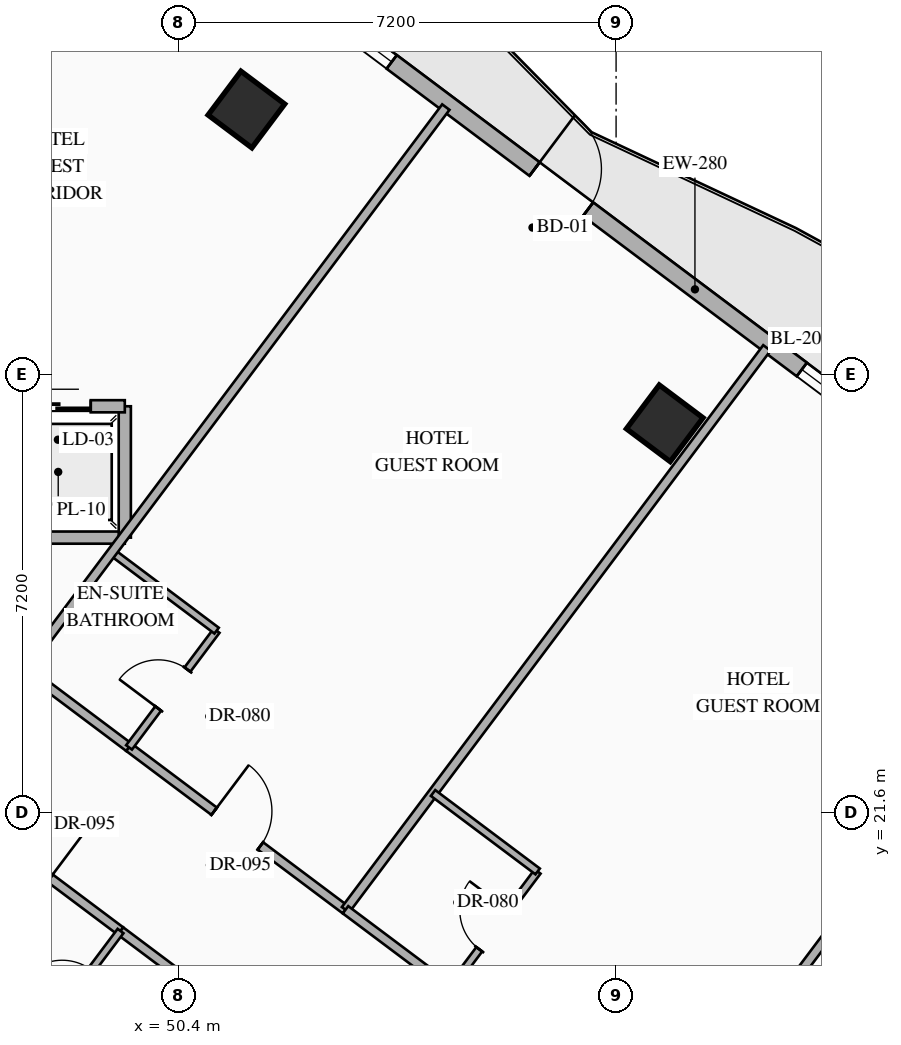
"""IFC4 building model, lengths in metres.
Left out: names, types, materials, properties, quantities, classifications, styles, units other than length and angle.
Written with IfcOpenShell. Run it as: python <this file> out.ifc"""

import sys

from ifc_helpers import new_model, si_unit, direction, frame, frame_2d, origin, origin_2d, place, context, subcontext, project, spatial, rectangle, hollow_rectangle, extrude, element, fill, save


model = new_model("IFC4")
c1 = context("Model", 3, precision=1e-05, world=origin(), true_north=direction((0.0, 1.0)))
c2 = subcontext(c1, "Body", "Model", "MODEL_VIEW")
j1 = project(units=[si_unit("LENGTHUNIT", "METRE"), si_unit("PLANEANGLEUNIT", "RADIAN")], contexts=[c1])
p1 = place(None, origin())
s1 = spatial("IfcSite", under=j1, at=p1, CompositionType="ELEMENT")
p2 = place(p1, origin())
s2 = spatial("IfcBuilding", under=s1, at=p2, CompositionType="ELEMENT")
p3 = place(p2, frame((0.0, 0.0, 77.95)))
s3 = spatial("IfcBuildingStorey", under=s2, at=p3, CompositionType="ELEMENT", Elevation=77.95)
for number, where, z_axis, x_axis in (
    (1, (51.52, 33.16, 0.0), (0.0, 0.0, 1.0), (0.8, -0.6, 0.0)),
    (2, (58.4, 28.0, 0.0), (0.0, 0.0, 1.0), (0.8, -0.6, 0.0)),
):
    element("IfcColumn", number, at=place(p3, frame(where, z_axis=z_axis, x_axis=x_axis)), inside=s3, PredefinedType="COLUMN", context=c2, shape_type="SweptSolid", body=[
        extrude(hollow_rectangle(XDim=0.9, YDim=0.9, WallThickness=0.036, at=origin_2d()), origin(), (0.0, 0.0, 1.0), 3.35),
    ])
p4 = place(p3, frame((44.86, 40.73, 0.0), z_axis=(0.0, 0.0, 1.0), x_axis=(0.800006902154, -0.599990797017, 0.0)))
e3 = element("IfcWall", 3, at=p4, inside=s3, PredefinedType="STANDARD", context=c2, shape_type="SweptSolid", body=[
    extrude(rectangle(XDim=29.712, YDim=0.28, at=frame_2d((14.856, 0.0))), origin(), (0.0, 0.0, 1.0), 3.13),
])
p5 = place(p4, frame((14.249, 0.0, 0.0)))
e4 = element("IfcOpeningElement", 4, at=p5, cuts=e3, PredefinedType="OPENING", context=c2, shape_type="SweptSolid", body=[
    extrude(rectangle(XDim=1.1, YDim=2.2, at=frame_2d((0.55, 1.1))), frame((0.0, 0.15, 0.0), z_axis=(0.0, -1.0, 0.0), x_axis=(1.0, 0.0, 0.0)), (0.0, 0.0, 1.0), 0.3),
])
p6 = place(p4, frame((1.612, 0.0, 0.85)))
e5 = element("IfcOpeningElement", 5, at=p6, cuts=e3, PredefinedType="OPENING", context=c2, shape_type="SweptSolid", body=[
    extrude(rectangle(XDim=1.4, YDim=1.8, at=frame_2d((0.7, 0.9))), frame((0.0, 0.15, 0.0), z_axis=(0.0, -1.0, 0.0), x_axis=(1.0, 0.0, 0.0)), (0.0, 0.0, 1.0), 0.3),
])
p7 = place(p4, frame((5.667, 0.0, 0.85)))
e6 = element("IfcOpeningElement", 6, at=p7, cuts=e3, PredefinedType="OPENING", context=c2, shape_type="SweptSolid", body=[
    extrude(rectangle(XDim=1.4, YDim=1.8, at=frame_2d((0.7, 0.9))), frame((0.0, 0.15, 0.0), z_axis=(0.0, -1.0, 0.0), x_axis=(1.0, 0.0, 0.0)), (0.0, 0.0, 1.0), 0.3),
])
p8 = place(p4, frame((9.912, 0.0, 0.85)))
e7 = element("IfcOpeningElement", 7, at=p8, cuts=e3, PredefinedType="OPENING", context=c2, shape_type="SweptSolid", body=[
    extrude(rectangle(XDim=1.4, YDim=1.8, at=frame_2d((0.7, 0.9))), frame((0.0, 0.15, 0.0), z_axis=(0.0, -1.0, 0.0), x_axis=(1.0, 0.0, 0.0)), (0.0, 0.0, 1.0), 0.3),
])
p9 = place(p4, frame((19.743, 0.0, 0.85)))
e8 = element("IfcOpeningElement", 8, at=p9, cuts=e3, PredefinedType="OPENING", context=c2, shape_type="SweptSolid", body=[
    extrude(rectangle(XDim=1.4, YDim=1.8, at=frame_2d((0.7, 0.9))), frame((0.0, 0.15, 0.0), z_axis=(0.0, -1.0, 0.0), x_axis=(1.0, 0.0, 0.0)), (0.0, 0.0, 1.0), 0.3),
])
p10 = place(p4, frame((22.645, 0.0, 0.85)))
e9 = element("IfcOpeningElement", 9, at=p10, cuts=e3, PredefinedType="OPENING", context=c2, shape_type="SweptSolid", body=[
    extrude(rectangle(XDim=1.4, YDim=1.8, at=frame_2d((0.7, 0.9))), frame((0.0, 0.15, 0.0), z_axis=(0.0, -1.0, 0.0), x_axis=(1.0, 0.0, 0.0)), (0.0, 0.0, 1.0), 0.3),
])
p11 = place(p4, frame((26.7, 0.0, 0.85)))
e10 = element("IfcOpeningElement", 10, at=p11, cuts=e3, PredefinedType="OPENING", context=c2, shape_type="SweptSolid", body=[
    extrude(rectangle(XDim=1.4, YDim=1.8, at=frame_2d((0.7, 0.9))), frame((0.0, 0.15, 0.0), z_axis=(0.0, -1.0, 0.0), x_axis=(1.0, 0.0, 0.0)), (0.0, 0.0, 1.0), 0.3),
])
p12 = place(p3, frame((53.318, 2.487, 0.0), z_axis=(0.0, 0.0, 1.0), x_axis=(-0.800004174678, 0.599994433723, 0.0)))
e11 = element("IfcWall", 11, at=p12, inside=s3, PredefinedType="STANDARD", context=c2, shape_type="SweptSolid", body=[
    extrude(rectangle(XDim=35.089, YDim=0.28, at=frame_2d((17.544, 0.0))), origin(), (0.0, 0.0, 1.0), 3.13),
])
p13 = place(p12, frame((1.931, 0.0, 0.85)))
e12 = element("IfcOpeningElement", 12, at=p13, cuts=e11, PredefinedType="OPENING", context=c2, shape_type="SweptSolid", body=[
    extrude(rectangle(XDim=1.4, YDim=1.8, at=frame_2d((0.7, 0.9))), frame((0.0, 0.15, 0.0), z_axis=(0.0, -1.0, 0.0), x_axis=(1.0, 0.0, 0.0)), (0.0, 0.0, 1.0), 0.3),
])
p14 = place(p12, frame((6.819, 0.0, 0.85)))
e13 = element("IfcOpeningElement", 13, at=p14, cuts=e11, PredefinedType="OPENING", context=c2, shape_type="SweptSolid", body=[
    extrude(rectangle(XDim=1.4, YDim=1.8, at=frame_2d((0.7, 0.9))), frame((0.0, 0.15, 0.0), z_axis=(0.0, -1.0, 0.0), x_axis=(1.0, 0.0, 0.0)), (0.0, 0.0, 1.0), 0.3),
])
p15 = place(p12, frame((11.832, 0.0, 0.85)))
e14 = element("IfcOpeningElement", 14, at=p15, cuts=e11, PredefinedType="OPENING", context=c2, shape_type="SweptSolid", body=[
    extrude(rectangle(XDim=1.4, YDim=1.8, at=frame_2d((0.7, 0.9))), frame((0.0, 0.15, 0.0), z_axis=(0.0, -1.0, 0.0), x_axis=(1.0, 0.0, 0.0)), (0.0, 0.0, 1.0), 0.3),
])
p16 = place(p12, frame((17.647, 0.0, 0.85)))
e15 = element("IfcOpeningElement", 15, at=p16, cuts=e11, PredefinedType="OPENING", context=c2, shape_type="SweptSolid", body=[
    extrude(rectangle(XDim=1.4, YDim=1.8, at=frame_2d((0.7, 0.9))), frame((0.0, 0.15, 0.0), z_axis=(0.0, -1.0, 0.0), x_axis=(1.0, 0.0, 0.0)), (0.0, 0.0, 1.0), 0.3),
])
p17 = place(p12, frame((21.857, 0.0, 0.85)))
e16 = element("IfcOpeningElement", 16, at=p17, cuts=e11, PredefinedType="OPENING", context=c2, shape_type="SweptSolid", body=[
    extrude(rectangle(XDim=1.4, YDim=1.8, at=frame_2d((0.7, 0.9))), frame((0.0, 0.15, 0.0), z_axis=(0.0, -1.0, 0.0), x_axis=(1.0, 0.0, 0.0)), (0.0, 0.0, 1.0), 0.3),
])
p18 = place(p12, frame((26.87, 0.0, 0.85)))
e17 = element("IfcOpeningElement", 17, at=p18, cuts=e11, PredefinedType="OPENING", context=c2, shape_type="SweptSolid", body=[
    extrude(rectangle(XDim=1.4, YDim=1.8, at=frame_2d((0.7, 0.9))), frame((0.0, 0.15, 0.0), z_axis=(0.0, -1.0, 0.0), x_axis=(1.0, 0.0, 0.0)), (0.0, 0.0, 1.0), 0.3),
])
p19 = place(p12, frame((31.757, 0.0, 0.85)))
e18 = element("IfcOpeningElement", 18, at=p19, cuts=e11, PredefinedType="OPENING", context=c2, shape_type="SweptSolid", body=[
    extrude(rectangle(XDim=1.4, YDim=1.8, at=frame_2d((0.7, 0.9))), frame((0.0, 0.15, 0.0), z_axis=(0.0, -1.0, 0.0), x_axis=(1.0, 0.0, 0.0)), (0.0, 0.0, 1.0), 0.3),
])
p20 = place(p3, frame((45.12, 26.12, 0.0), z_axis=(0.0, 0.0, 1.0), x_axis=(1.0, 0.0, 0.0)))
e19 = element("IfcWall", 19, at=p20, inside=s3, PredefinedType="STANDARD", context=c2, shape_type="SweptSolid", body=[
    extrude(rectangle(XDim=4.4, YDim=0.2, at=frame_2d((2.2, 0.0))), origin(), (0.0, 0.0, 1.0), 3.13),
])
p21 = place(p3, frame((49.52, 26.12, 0.0), z_axis=(0.0, 0.0, 1.0), x_axis=(0.0, 1.0, 0.0)))
e20 = element("IfcWall", 20, at=p21, inside=s3, PredefinedType="STANDARD", context=c2, shape_type="SweptSolid", body=[
    extrude(rectangle(XDim=2.16, YDim=0.2, at=frame_2d((1.08, 0.0))), origin(), (0.0, 0.0, 1.0), 3.13),
])
p22 = place(p3, frame((45.12, 28.28, 0.0), z_axis=(0.0, 0.0, 1.0), x_axis=(1.0, 0.0, 0.0)))
e21 = element("IfcWall", 21, at=p22, inside=s3, PredefinedType="STANDARD", context=c2, shape_type="SweptSolid", body=[
    extrude(rectangle(XDim=4.4, YDim=0.2, at=frame_2d((2.2, 0.0))), origin(), (0.0, 0.0, 1.0), 3.13),
])
p23 = place(p22, frame((0.56, 0.0, 0.0)))
e22 = element("IfcOpeningElement", 22, at=p23, cuts=e21, PredefinedType="OPENING", context=c2, shape_type="SweptSolid", body=[
    extrude(rectangle(XDim=1.08, YDim=2.15, at=frame_2d((0.54, 1.075))), frame((0.0, 0.11, 0.0), z_axis=(0.0, -1.0, 0.0), x_axis=(1.0, 0.0, 0.0)), (0.0, 0.0, 1.0), 0.22),
])
p24 = place(p22, frame((2.76, 0.0, 0.0)))
e23 = element("IfcOpeningElement", 23, at=p24, cuts=e21, PredefinedType="OPENING", context=c2, shape_type="SweptSolid", body=[
    extrude(rectangle(XDim=1.08, YDim=2.15, at=frame_2d((0.54, 1.075))), frame((0.0, 0.11, 0.0), z_axis=(0.0, -1.0, 0.0), x_axis=(1.0, 0.0, 0.0)), (0.0, 0.0, 1.0), 0.22),
])
p25 = place(p3, frame((47.87, 23.96, 0.0), z_axis=(0.0, 0.0, 1.0), x_axis=(0.79998637334, -0.60001816845, 0.0)))
e24 = element("IfcWall", 24, at=p25, inside=s3, PredefinedType="PARTITIONING", context=c2, shape_type="SweptSolid", body=[
    extrude(rectangle(XDim=2.15, YDim=0.15, at=frame_2d((1.075, 0.0))), origin(), (0.0, 0.0, 1.0), 2.775),
])
p26 = place(p3, frame((49.59, 22.67, 0.0), z_axis=(0.0, 0.0, 1.0), x_axis=(0.799993416095, -0.600008778439, 0.0)))
e25 = element("IfcWall", 25, at=p26, inside=s3, PredefinedType="PARTITIONING", context=c2, shape_type="SweptSolid", body=[
    extrude(rectangle(XDim=4.45, YDim=0.15, at=frame_2d((2.225, 0.0))), origin(), (0.0, 0.0, 1.0), 2.775),
])
p27 = place(p26, frame((1.75, 0.0, 0.0)))
e26 = element("IfcOpeningElement", 26, at=p27, cuts=e25, PredefinedType="OPENING", context=c2, shape_type="SweptSolid", body=[
    extrude(rectangle(XDim=0.95, YDim=2.15, at=frame_2d((0.475, 1.075))), frame((0.0, 0.085, 0.0), z_axis=(0.0, -1.0, 0.0), x_axis=(1.0, 0.0, 0.0)), (0.0, 0.0, 1.0), 0.17),
])
p28 = place(p3, frame((49.59, 22.67, 0.0), z_axis=(0.0, 0.0, 1.0), x_axis=(0.599951172744, 0.800036618114, 0.0)))
e27 = element("IfcWall", 27, at=p28, inside=s3, PredefinedType="PARTITIONING", context=c2, shape_type="SweptSolid", body=[
    extrude(rectangle(XDim=2.4, YDim=0.12, at=frame_2d((1.2, 0.0))), origin(), (0.0, 0.0, 1.0), 3.13),
])
p29 = place(p28, frame((0.8, 0.0, 0.0)))
e28 = element("IfcOpeningElement", 28, at=p29, cuts=e27, PredefinedType="OPENING", context=c2, shape_type="SweptSolid", body=[
    extrude(rectangle(XDim=0.8, YDim=2.06, at=frame_2d((0.4, 1.03))), frame((0.0, 0.07, 0.0), z_axis=(0.0, -1.0, 0.0), x_axis=(1.0, 0.0, 0.0)), (0.0, 0.0, 1.0), 0.14),
])
p30 = place(p3, frame((49.31, 25.88, 0.0), z_axis=(0.0, 0.0, 1.0), x_axis=(0.800040880289, -0.59994548908, 0.0)))
e29 = element("IfcWall", 29, at=p30, inside=s3, PredefinedType="PARTITIONING", context=c2, shape_type="SweptSolid", body=[
    extrude(rectangle(XDim=2.15, YDim=0.12, at=frame_2d((1.075, 0.0))), origin(), (0.0, 0.0, 1.0), 3.13),
])
for number, where, z_axis, x_axis in (
    (30, (47.87, 23.96, 0.0), (0.0, 0.0, 1.0), (0.6, 0.8, 0.0)),
    (31, (53.15, 20.0, 0.0), (0.0, 0.0, 1.0), (0.6, 0.8, 0.0)),
):
    element("IfcWall", number, at=place(p3, frame(where, z_axis=z_axis, x_axis=x_axis)), inside=s3, PredefinedType="PARTITIONING", context=c2, shape_type="SweptSolid", body=[
        extrude(rectangle(XDim=11.55, YDim=0.15, at=frame_2d((5.775, 0.0))), origin(), (0.0, 0.0, 1.0), 3.13),
    ])
p31 = place(p3, frame((53.15, 20.0, 0.0), z_axis=(0.0, 0.0, 1.0), x_axis=(0.800027249606, -0.599963665473, 0.0)))
e32 = element("IfcWall", 32, at=p31, inside=s3, PredefinedType="PARTITIONING", context=c2, shape_type="SweptSolid", body=[
    extrude(rectangle(XDim=2.15, YDim=0.15, at=frame_2d((1.075, 0.0))), origin(), (0.0, 0.0, 1.0), 2.775),
])
p32 = place(p3, frame((54.87, 18.71, 0.0), z_axis=(0.0, 0.0, 1.0), x_axis=(0.6, 0.8, 0.0)))
e33 = element("IfcWall", 33, at=p32, inside=s3, PredefinedType="PARTITIONING", context=c2, shape_type="SweptSolid", body=[
    extrude(rectangle(XDim=2.4, YDim=0.12, at=frame_2d((1.2, 0.0))), origin(), (0.0, 0.0, 1.0), 3.13),
])
p33 = place(p32, frame((0.8, 0.0, 0.0)))
e34 = element("IfcOpeningElement", 34, at=p33, cuts=e33, PredefinedType="OPENING", context=c2, shape_type="SweptSolid", body=[
    extrude(rectangle(XDim=0.8, YDim=2.06, at=frame_2d((0.4, 1.03))), frame((0.0, 0.07, 0.0), z_axis=(0.0, -1.0, 0.0), x_axis=(1.0, 0.0, 0.0)), (0.0, 0.0, 1.0), 0.14),
])
p34 = place(p3, frame((54.59, 21.92, 0.0), z_axis=(0.0, 0.0, 1.0), x_axis=(0.79998637334, -0.60001816845, 0.0)))
e35 = element("IfcWall", 35, at=p34, inside=s3, PredefinedType="PARTITIONING", context=c2, shape_type="SweptSolid", body=[
    extrude(rectangle(XDim=2.15, YDim=0.12, at=frame_2d((1.075, 0.0))), origin(), (0.0, 0.0, 1.0), 3.13),
])
p35 = place(p3, frame((58.43, 16.04, 0.0), z_axis=(0.0, 0.0, 1.0), x_axis=(0.60001014597, 0.799992390422, 0.0)))
e36 = element("IfcWall", 36, at=p35, inside=s3, PredefinedType="PARTITIONING", context=c2, shape_type="SweptSolid", body=[
    extrude(rectangle(XDim=11.55, YDim=0.15, at=frame_2d((5.775, 0.0))), origin(), (0.0, 0.0, 1.0), 3.13),
])
p36 = place(p3, frame((46.37, 21.96, 0.0), z_axis=(0.0, 0.0, 1.0), x_axis=(0.799977170108, -0.600030438649, 0.0)))
e37 = element("IfcWall", 37, at=p36, inside=s3, PredefinedType="PARTITIONING", context=c2, shape_type="SweptSolid", body=[
    extrude(rectangle(XDim=3.85, YDim=0.15, at=frame_2d((1.925, 0.0))), origin(), (0.0, 0.0, 1.0), 2.425),
])
p37 = place(p36, frame((1.45, 0.0, 0.0)))
e38 = element("IfcOpeningElement", 38, at=p37, cuts=e37, PredefinedType="OPENING", context=c2, shape_type="SweptSolid", body=[
    extrude(rectangle(XDim=0.95, YDim=2.15, at=frame_2d((0.475, 1.075))), frame((0.0, 0.085, 0.0), z_axis=(0.0, -1.0, 0.0), x_axis=(1.0, 0.0, 0.0)), (0.0, 0.0, 1.0), 0.17),
])
p38 = place(p3, frame((49.45, 19.65, 0.0), z_axis=(0.0, 0.0, 1.0), x_axis=(0.800040880289, -0.59994548908, 0.0)))
e39 = element("IfcWall", 39, at=p38, inside=s3, PredefinedType="PARTITIONING", context=c2, shape_type="SweptSolid", body=[
    extrude(rectangle(XDim=2.15, YDim=0.15, at=frame_2d((1.075, 0.0))), origin(), (0.0, 0.0, 1.0), 2.425),
])
p39 = place(p3, frame((48.01, 17.73, 0.0), z_axis=(0.0, 0.0, 1.0), x_axis=(0.6, 0.8, 0.0)))
e40 = element("IfcWall", 40, at=p39, inside=s3, PredefinedType="PARTITIONING", context=c2, shape_type="SweptSolid", body=[
    extrude(rectangle(XDim=2.4, YDim=0.12, at=frame_2d((1.2, 0.0))), origin(), (0.0, 0.0, 1.0), 3.13),
])
p40 = place(p39, frame((0.8, 0.0, 0.0)))
e41 = element("IfcOpeningElement", 41, at=p40, cuts=e40, PredefinedType="OPENING", context=c2, shape_type="SweptSolid", body=[
    extrude(rectangle(XDim=0.8, YDim=2.06, at=frame_2d((0.4, 1.03))), frame((0.0, 0.07, 0.0), z_axis=(0.0, -1.0, 0.0), x_axis=(1.0, 0.0, 0.0)), (0.0, 0.0, 1.0), 0.14),
])
p41 = place(p5, origin())
e42 = element("IfcDoor", 42, at=p41, inside=s3, OperationType="SINGLE_SWING_LEFT", PredefinedType="DOOR", context=c2, shape_type="SweptSolid", body=[
    extrude(rectangle(XDim=1.1, YDim=2.2, at=frame_2d((0.55, 1.1))), frame((0.0, 0.025, 0.0), z_axis=(0.0, -1.0, 0.0), x_axis=(1.0, 0.0, 0.0)), (0.0, 0.0, 1.0), 0.05),
])
fill(e4, e42)
p42 = place(p8, origin())
e43 = element("IfcWindow", 43, at=p42, inside=s3, PartitioningType="SINGLE_PANEL", PredefinedType="WINDOW", context=c2, shape_type="SweptSolid", body=[
    extrude(rectangle(XDim=1.4, YDim=1.8, at=frame_2d((0.7, 0.9))), frame((0.0, 0.03, 0.0), z_axis=(0.0, -1.0, 0.0), x_axis=(1.0, 0.0, 0.0)), (0.0, 0.0, 1.0), 0.06),
])
fill(e7, e43)
p43 = place(p9, origin())
e44 = element("IfcWindow", 44, at=p43, inside=s3, PartitioningType="SINGLE_PANEL", PredefinedType="WINDOW", context=c2, shape_type="SweptSolid", body=[
    extrude(rectangle(XDim=1.4, YDim=1.8, at=frame_2d((0.7, 0.9))), frame((0.0, 0.03, 0.0), z_axis=(0.0, -1.0, 0.0), x_axis=(1.0, 0.0, 0.0)), (0.0, 0.0, 1.0), 0.06),
])
fill(e8, e44)
p44 = place(p24, origin())
e45 = element("IfcDoor", 45, at=p44, inside=s3, OperationType="SLIDING_TO_LEFT", PredefinedType="USERDEFINED", context=c2, shape_type="SweptSolid", body=[
    extrude(rectangle(XDim=1.08, YDim=2.15, at=frame_2d((0.54, 1.075))), frame((0.0, 0.025, 0.0), z_axis=(0.0, -1.0, 0.0), x_axis=(1.0, 0.0, 0.0)), (0.0, 0.0, 1.0), 0.05),
])
fill(e23, e45)
p45 = place(p27, origin())
e46 = element("IfcDoor", 46, at=p45, inside=s3, OperationType="SINGLE_SWING_LEFT", PredefinedType="DOOR", context=c2, shape_type="SweptSolid", body=[
    extrude(rectangle(XDim=0.95, YDim=2.15, at=frame_2d((0.475, 1.075))), frame((0.0, 0.025, 0.0), z_axis=(0.0, -1.0, 0.0), x_axis=(1.0, 0.0, 0.0)), (0.0, 0.0, 1.0), 0.05),
])
fill(e26, e46)
p46 = place(p29, origin())
e47 = element("IfcDoor", 47, at=p46, inside=s3, OperationType="SINGLE_SWING_LEFT", PredefinedType="DOOR", context=c2, shape_type="SweptSolid", body=[
    extrude(rectangle(XDim=0.8, YDim=2.06, at=frame_2d((0.4, 1.03))), frame((0.0, 0.025, 0.0), z_axis=(0.0, -1.0, 0.0), x_axis=(1.0, 0.0, 0.0)), (0.0, 0.0, 1.0), 0.05),
])
fill(e28, e47)
p47 = place(p33, origin())
e48 = element("IfcDoor", 48, at=p47, inside=s3, OperationType="SINGLE_SWING_RIGHT", PredefinedType="DOOR", context=c2, shape_type="SweptSolid", body=[
    extrude(rectangle(XDim=0.8, YDim=2.06, at=frame_2d((0.4, 1.03))), frame((0.0, 0.025, 0.0), z_axis=(0.0, -1.0, 0.0), x_axis=(1.0, 0.0, 0.0)), (0.0, 0.0, 1.0), 0.05),
])
fill(e34, e48)
save(model, sys.argv[1])
